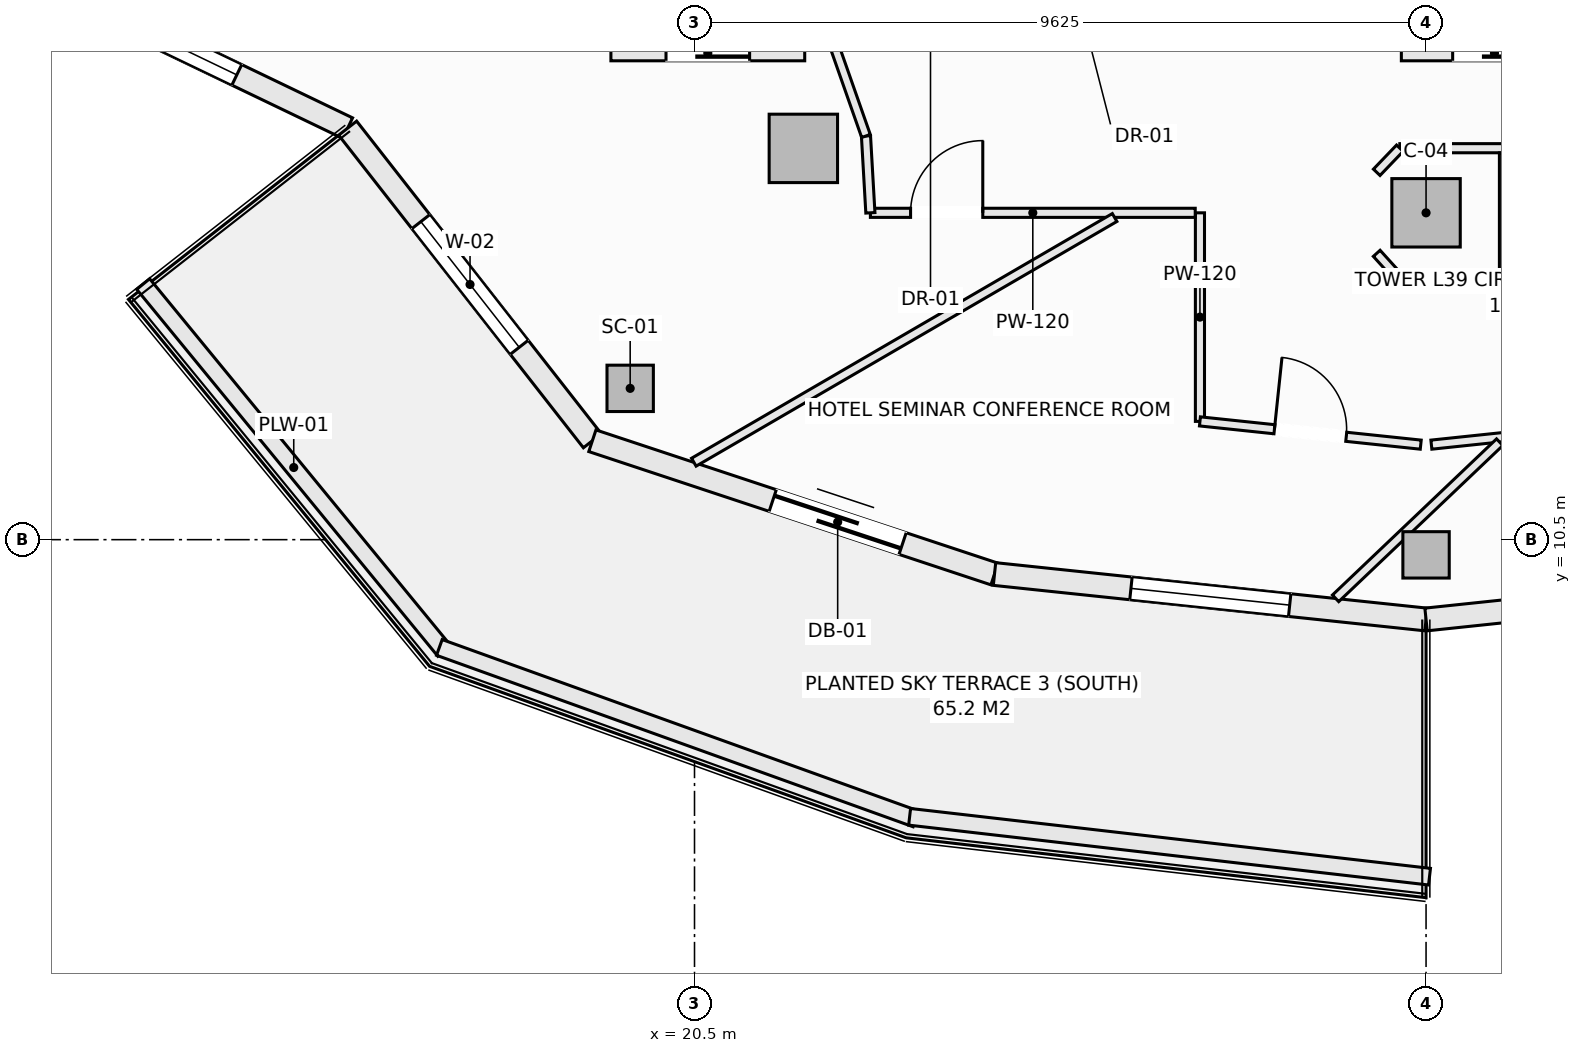
"""IFC4 building model, lengths in metres.
Left out: names, types, materials, properties, quantities, classifications, styles, units other than length and angle.
Written with IfcOpenShell. Run it as: python <this file> out.ifc"""

import sys

from ifc_helpers import new_model, si_unit, direction, frame, frame_2d, origin, origin_2d, place, context, subcontext, project, spatial, rectangle, hollow_rectangle, extrude, element, fill, save


model = new_model("IFC4")
c1 = context("Model", 3, precision=1e-05, world=origin(), true_north=direction((0.0, 1.0)))
c2 = subcontext(c1, "Body", "Model", "MODEL_VIEW")
j1 = project(units=[si_unit("LENGTHUNIT", "METRE"), si_unit("PLANEANGLEUNIT", "RADIAN")], contexts=[c1])
p1 = place(None, origin())
s1 = spatial("IfcSite", under=j1, at=p1, CompositionType="ELEMENT")
p2 = place(p1, origin())
s2 = spatial("IfcBuilding", under=s1, at=p2, CompositionType="ELEMENT")
p3 = place(p2, frame((0.0, 0.0, 152.9)))
s3 = spatial("IfcBuildingStorey", under=s2, at=p3, CompositionType="ELEMENT", Elevation=152.9)
for number, where, z_axis, x_axis in (
    (1, (19.654, 12.49, -0.27), (0.0, 0.0, 1.0), (1.0, 0.0, 0.0)),
    (2, (30.125, 10.3, -0.27), (0.0, 0.0, 1.0), (1.0, 0.0, 0.0)),
):
    element("IfcColumn", number, at=place(p3, frame(where, z_axis=z_axis, x_axis=x_axis)), inside=s3, PredefinedType="COLUMN", context=c2, shape_type="SweptSolid", body=[
        extrude(hollow_rectangle(XDim=0.61, YDim=0.61, WallThickness=0.025, at=origin_2d()), origin(), (0.0, 0.0, 1.0), 3.4),
    ])
for number, where, z_axis, x_axis in (
    (3, (21.932, 15.648, -0.27), (0.0, 0.0, 1.0), (1.0, 0.0, 0.0)),
    (4, (30.125, 14.8, -0.27), (0.0, 0.0, 1.0), (1.0, 0.0, 0.0)),
):
    element("IfcColumn", number, at=place(p3, frame(where, z_axis=z_axis, x_axis=x_axis)), inside=s3, PredefinedType="COLUMN", context=c2, shape_type="SweptSolid", body=[
        extrude(rectangle(XDim=0.9, YDim=0.9, at=origin_2d()), origin(), (0.0, 0.0, 1.0), 3.4),
    ])
p4 = place(p3, frame((11.127, 18.225, 0.0), z_axis=(0.0, 0.0, 1.0), x_axis=(0.901353070301, -0.433085029363, 0.0)))
e5 = element("IfcWall", 5, at=p4, inside=s3, PredefinedType="SOLIDWALL", context=c2, shape_type="SweptSolid", body=[
    extrude(rectangle(XDim=5.336, YDim=0.3, at=frame_2d((2.668, 0.0))), origin(), (0.0, 0.0, 1.0), 2.653),
])
p5 = place(p4, frame((1.618, 0.0, 0.74)))
e6 = element("IfcOpeningElement", 6, at=p5, cuts=e5, PredefinedType="OPENING", context=c2, shape_type="SweptSolid", body=[
    extrude(rectangle(XDim=2.1, YDim=1.7, at=frame_2d((1.05, 0.85))), frame((0.0, 0.16, 0.0), z_axis=(0.0, -1.0, 0.0), x_axis=(1.0, 0.0, 0.0)), (0.0, 0.0, 1.0), 0.32),
])
p6 = place(p3, frame((15.937, 15.914, 0.0), z_axis=(0.0, 0.0, 1.0), x_axis=(0.616429245738, -0.787410302828, 0.0)))
e7 = element("IfcWall", 7, at=p6, inside=s3, PredefinedType="SOLIDWALL", context=c2, shape_type="SweptSolid", body=[
    extrude(rectangle(XDim=5.223, YDim=0.3, at=frame_2d((2.612, 0.0))), origin(), (0.0, 0.0, 1.0), 2.653),
])
p7 = place(p6, frame((1.562, 0.0, 0.74)))
e8 = element("IfcOpeningElement", 8, at=p7, cuts=e7, PredefinedType="OPENING", context=c2, shape_type="SweptSolid", body=[
    extrude(rectangle(XDim=2.1, YDim=1.7, at=frame_2d((1.05, 0.85))), frame((0.0, 0.16, 0.0), z_axis=(0.0, -1.0, 0.0), x_axis=(1.0, 0.0, 0.0)), (0.0, 0.0, 1.0), 0.32),
])
p8 = place(p3, frame((19.156, 11.801, 0.0), z_axis=(0.0, 0.0, 1.0), x_axis=(0.949246811547, -0.314532177636, 0.0)))
e9 = element("IfcWall", 9, at=p8, inside=s3, PredefinedType="SOLIDWALL", context=c2, shape_type="SweptSolid", body=[
    extrude(rectangle(XDim=5.574, YDim=0.3, at=frame_2d((2.787, 0.0))), origin(), (0.0, 0.0, 1.0), 2.653),
])
p9 = place(p8, frame((2.5, 0.0, 0.0)))
e10 = element("IfcOpeningElement", 10, at=p9, cuts=e9, PredefinedType="OPENING", context=c2, shape_type="SweptSolid", body=[
    extrude(rectangle(XDim=1.8, YDim=2.25, at=frame_2d((0.9, 1.125))), frame((0.0, 0.16, 0.0), z_axis=(0.0, -1.0, 0.0), x_axis=(1.0, 0.0, 0.0)), (0.0, 0.0, 1.0), 0.32),
])
p10 = place(p3, frame((24.447, 10.048, 0.0), z_axis=(0.0, 0.0, 1.0), x_axis=(0.994496545245, -0.104769372887, 0.0)))
e11 = element("IfcWall", 11, at=p10, inside=s3, PredefinedType="SOLIDWALL", context=c2, shape_type="SweptSolid", body=[
    extrude(rectangle(XDim=5.709, YDim=0.3, at=frame_2d((2.854, 0.0))), origin(), (0.0, 0.0, 1.0), 2.653),
])
p11 = place(p10, frame((1.805, 0.0, 0.74)))
e12 = element("IfcOpeningElement", 12, at=p11, cuts=e11, PredefinedType="OPENING", context=c2, shape_type="SweptSolid", body=[
    extrude(rectangle(XDim=2.1, YDim=1.7, at=frame_2d((1.05, 0.85))), frame((0.0, 0.16, 0.0), z_axis=(0.0, -1.0, 0.0), x_axis=(1.0, 0.0, 0.0)), (0.0, 0.0, 1.0), 0.32),
])
p12 = place(p3, frame((30.125, 9.45, 0.0), z_axis=(0.0, 0.0, 1.0), x_axis=(0.994496545245, 0.104769372887, 0.0)))
e13 = element("IfcWall", 13, at=p12, inside=s3, PredefinedType="SOLIDWALL", context=c2, shape_type="SweptSolid", body=[
    extrude(rectangle(XDim=5.709, YDim=0.3, at=frame_2d((2.854, 0.0))), origin(), (0.0, 0.0, 1.0), 2.653),
])
p13 = place(p12, frame((1.805, 0.0, 0.74)))
e14 = element("IfcOpeningElement", 14, at=p13, cuts=e13, PredefinedType="OPENING", context=c2, shape_type="SweptSolid", body=[
    extrude(rectangle(XDim=2.1, YDim=1.7, at=frame_2d((1.05, 0.85))), frame((0.0, 0.16, 0.0), z_axis=(0.0, -1.0, 0.0), x_axis=(1.0, 0.0, 0.0)), (0.0, 0.0, 1.0), 0.32),
])
p14 = place(p3, frame((13.246, 13.863, 0.0), z_axis=(0.0, 0.0, 1.0), x_axis=(0.634429234628, -0.77298094818, 0.0)))
e15 = element("IfcWall", 15, at=p14, inside=s3, PredefinedType="PARAPET", context=c2, shape_type="SweptSolid", body=[
    extrude(rectangle(XDim=6.245, YDim=0.22, at=frame_2d((3.123, 0.0))), origin(), (0.0, 0.0, 1.0), 0.52),
])
p15 = place(p3, frame((17.143, 9.082, 0.0), z_axis=(0.0, 0.0, 1.0), x_axis=(0.940948576924, -0.338549517184, 0.0)))
e16 = element("IfcWall", 16, at=p15, inside=s3, PredefinedType="PARAPET", context=c2, shape_type="SweptSolid", body=[
    extrude(rectangle(XDim=6.664, YDim=0.22, at=frame_2d((3.332, 0.0))), origin(), (0.0, 0.0, 1.0), 0.52),
])
p16 = place(p3, frame((23.33, 6.854, 0.0), z_axis=(0.0, 0.0, 1.0), x_axis=(0.993440576506, -0.114349555972, 0.0)))
e17 = element("IfcWall", 17, at=p16, inside=s3, PredefinedType="PARAPET", context=c2, shape_type="SweptSolid", body=[
    extrude(rectangle(XDim=6.885, YDim=0.22, at=frame_2d((3.443, 0.0))), origin(), (0.0, 0.0, 1.0), 0.52),
])
p17 = place(p3, frame((19.4, 16.9, 0.0), z_axis=(0.0, 0.0, 1.0), x_axis=(1.0, 0.0, 0.0)))
e18 = element("IfcWall", 18, at=p17, inside=s3, PredefinedType="SOLIDWALL", context=c2, shape_type="SweptSolid", body=[
    extrude(rectangle(XDim=2.55, YDim=0.2, at=frame_2d((1.275, 0.0))), origin(), (0.0, 0.0, 1.0), 3.13),
])
p18 = place(p17, frame((0.725, 0.0, 0.0)))
e19 = element("IfcOpeningElement", 19, at=p18, cuts=e18, PredefinedType="OPENING", context=c2, shape_type="SweptSolid", body=[
    extrude(rectangle(XDim=1.1, YDim=2.2, at=frame_2d((0.55, 1.1))), frame((0.0, 0.11, 0.0), z_axis=(0.0, -1.0, 0.0), x_axis=(1.0, 0.0, 0.0)), (0.0, 0.0, 1.0), 0.22),
])
p19 = place(p3, frame((29.8, 16.9, 0.0), z_axis=(0.0, 0.0, 1.0), x_axis=(1.0, 0.0, 0.0)))
e20 = element("IfcWall", 20, at=p19, inside=s3, PredefinedType="SOLIDWALL", context=c2, shape_type="SweptSolid", body=[
    extrude(rectangle(XDim=2.45, YDim=0.2, at=frame_2d((1.225, 0.0))), origin(), (0.0, 0.0, 1.0), 3.13),
])
p20 = place(p19, frame((0.675, 0.0, 0.0)))
e21 = element("IfcOpeningElement", 21, at=p20, cuts=e20, PredefinedType="OPENING", context=c2, shape_type="SweptSolid", body=[
    extrude(rectangle(XDim=1.1, YDim=2.2, at=frame_2d((0.55, 1.1))), frame((0.0, 0.11, 0.0), z_axis=(0.0, -1.0, 0.0), x_axis=(1.0, 0.0, 0.0)), (0.0, 0.0, 1.0), 0.22),
])
p21 = place(p3, frame((27.15, 12.056, 0.0), z_axis=(0.0, 0.0, 1.0), x_axis=(0.0, 1.0, 0.0)))
e22 = element("IfcWall", 22, at=p21, inside=s3, PredefinedType="PARTITIONING", context=c2, shape_type="SweptSolid", body=[
    extrude(rectangle(XDim=2.744, YDim=0.12, at=frame_2d((1.372, 0.0))), origin(), (0.0, 0.0, 1.0), 3.13),
])
p22 = place(p3, frame((29.78, 15.65, 0.0), z_axis=(0.0, 0.0, 1.0), x_axis=(1.0, 0.0, 0.0)))
e23 = element("IfcWall", 23, at=p22, inside=s3, PredefinedType="PARTITIONING", context=c2, shape_type="SweptSolid", body=[
    extrude(rectangle(XDim=1.37, YDim=0.12, at=frame_2d((0.685, 0.0))), origin(), (0.0, 0.0, 1.0), 3.13),
])
p23 = place(p3, frame((30.195, 11.75, 0.0), z_axis=(0.0, 0.0, 1.0), x_axis=(0.994498907508, 0.104746947287, 0.0)))
e24 = element("IfcWall", 24, at=p23, inside=s3, PredefinedType="PARTITIONING", context=c2, shape_type="SweptSolid", body=[
    extrude(rectangle(XDim=5.724, YDim=0.12, at=frame_2d((2.862, 0.0))), origin(), (0.0, 0.0, 1.0), 3.13),
])
p24 = place(p23, frame((2.594, 0.0, 0.0)))
e25 = element("IfcOpeningElement", 25, at=p24, cuts=e24, PredefinedType="OPENING", context=c2, shape_type="SweptSolid", body=[
    extrude(rectangle(XDim=0.95, YDim=2.1, at=frame_2d((0.475, 1.05))), frame((0.0, 0.07, 0.0), z_axis=(0.0, -1.0, 0.0), x_axis=(1.0, 0.0, 0.0)), (0.0, 0.0, 1.0), 0.14),
])
p25 = place(p3, frame((27.15, 12.056, 0.0), z_axis=(0.0, 0.0, 1.0), x_axis=(0.994501330468, -0.104723940422, 0.0)))
e26 = element("IfcWall", 26, at=p25, inside=s3, PredefinedType="PARTITIONING", context=c2, shape_type="SweptSolid", body=[
    extrude(rectangle(XDim=2.921, YDim=0.12, at=frame_2d((1.46, 0.0))), origin(), (0.0, 0.0, 1.0), 3.13),
])
p26 = place(p25, frame((0.986, 0.0, 0.0)))
e27 = element("IfcOpeningElement", 27, at=p26, cuts=e26, PredefinedType="OPENING", context=c2, shape_type="SweptSolid", body=[
    extrude(rectangle(XDim=0.95, YDim=2.1, at=frame_2d((0.475, 1.05))), frame((0.0, 0.07, 0.0), z_axis=(0.0, -1.0, 0.0), x_axis=(1.0, 0.0, 0.0)), (0.0, 0.0, 1.0), 0.14),
])
p27 = place(p3, frame((22.814, 14.8, 0.0), z_axis=(0.0, 0.0, 1.0), x_axis=(1.0, 0.0, 0.0)))
e28 = element("IfcWall", 28, at=p27, inside=s3, PredefinedType="PARTITIONING", context=c2, shape_type="SweptSolid", body=[
    extrude(rectangle(XDim=4.274, YDim=0.12, at=frame_2d((2.137, 0.0))), origin(), (0.0, 0.0, 1.0), 3.13),
])
p28 = place(p27, frame((0.529, 0.0, 0.0)))
e29 = element("IfcOpeningElement", 29, at=p28, cuts=e28, PredefinedType="OPENING", context=c2, shape_type="SweptSolid", body=[
    extrude(rectangle(XDim=0.95, YDim=2.1, at=frame_2d((0.475, 1.05))), frame((0.0, 0.07, 0.0), z_axis=(0.0, -1.0, 0.0), x_axis=(1.0, 0.0, 0.0)), (0.0, 0.0, 1.0), 0.14),
])
p29 = place(p3, frame((22.756, 15.811, 0.0), z_axis=(0.0, 0.0, 1.0), x_axis=(0.057139047697, -0.998366230012, 0.0)))
e30 = element("IfcWall", 30, at=p29, inside=s3, PredefinedType="PARTITIONING", context=c2, shape_type="SweptSolid", body=[
    extrude(rectangle(XDim=1.013, YDim=0.12, at=frame_2d((0.506, 0.0))), origin(), (0.0, 0.0, 1.0), 3.13),
])
p30 = place(p3, frame((22.353, 16.958, 0.0), z_axis=(0.0, 0.0, 1.0), x_axis=(0.331370038458, -0.943500873138, 0.0)))
e31 = element("IfcWall", 31, at=p30, inside=s3, PredefinedType="PARTITIONING", context=c2, shape_type="SweptSolid", body=[
    extrude(rectangle(XDim=1.216, YDim=0.12, at=frame_2d((0.608, 0.0))), origin(), (0.0, 0.0, 1.0), 3.13),
])
p31 = place(p3, frame((29.476, 15.333, 0.0), z_axis=(0.0, 0.0, 1.0), x_axis=(0.692219273951, 0.721687243043, 0.0)))
e32 = element("IfcWall", 32, at=p31, inside=s3, PredefinedType="PARTITIONING", context=c2, shape_type="SweptSolid", body=[
    extrude(rectangle(XDim=0.439, YDim=0.12, at=frame_2d((0.22, 0.0))), origin(), (0.0, 0.0, 1.0), 3.13),
])
p32 = place(p3, frame((29.476, 14.267, 0.0), z_axis=(0.0, 0.0, 1.0), x_axis=(0.670659392016, -0.741765448037, 0.0)))
e33 = element("IfcWall", 33, at=p32, inside=s3, PredefinedType="PARTITIONING", context=c2, shape_type="SweptSolid", body=[
    extrude(rectangle(XDim=0.453, YDim=0.12, at=frame_2d((0.227, 0.0))), origin(), (0.0, 0.0, 1.0), 3.13),
])
p33 = place(p3, frame((29.78, 13.85, 0.0), z_axis=(0.0, 0.0, 1.0), x_axis=(1.0, 0.0, 0.0)))
e34 = element("IfcWall", 34, at=p33, inside=s3, PredefinedType="PARTITIONING", context=c2, shape_type="SweptSolid", body=[
    extrude(rectangle(XDim=1.37, YDim=0.12, at=frame_2d((0.685, 0.0))), origin(), (0.0, 0.0, 1.0), 3.13),
])
p34 = place(p3, frame((31.15, 13.912, 0.0), z_axis=(0.0, 0.0, 1.0), x_axis=(0.0, 1.0, 0.0)))
e35 = element("IfcWall", 35, at=p34, inside=s3, PredefinedType="PARTITIONING", context=c2, shape_type="SweptSolid", body=[
    extrude(rectangle(XDim=1.676, YDim=0.12, at=frame_2d((0.838, 0.0))), origin(), (0.0, 0.0, 1.0), 3.13),
])
p35 = place(p3, frame((20.491, 11.519, 0.0), z_axis=(0.0, 0.0, 1.0), x_axis=(0.864495629624, 0.502640334991, 0.0)))
e36 = element("IfcWall", 36, at=p35, inside=s3, PredefinedType="PARTITIONING", context=c2, shape_type="SweptSolid", body=[
    extrude(rectangle(XDim=6.404, YDim=0.12, at=frame_2d((3.202, 0.0))), origin(), (0.0, 0.0, 1.0), 3.13),
])
p36 = place(p3, frame((28.935, 9.728, 0.0), z_axis=(0.0, 0.0, 1.0), x_axis=(0.724541098321, 0.689231598843, 0.0)))
e37 = element("IfcWall", 37, at=p36, inside=s3, PredefinedType="PARTITIONING", context=c2, shape_type="SweptSolid", body=[
    extrude(rectangle(XDim=2.98, YDim=0.12, at=frame_2d((1.49, 0.0))), origin(), (0.0, 0.0, 1.0), 2.703),
])
p37 = place(p5, origin())
e38 = element("IfcWindow", 38, at=p37, inside=s3, PartitioningType="SINGLE_PANEL", PredefinedType="WINDOW", context=c2, shape_type="SweptSolid", body=[
    extrude(rectangle(XDim=2.1, YDim=1.7, at=frame_2d((1.05, 0.85))), frame((0.0, 0.03, 0.0), z_axis=(0.0, -1.0, 0.0), x_axis=(1.0, 0.0, 0.0)), (0.0, 0.0, 1.0), 0.06),
])
fill(e6, e38)
p38 = place(p7, origin())
e39 = element("IfcWindow", 39, at=p38, inside=s3, PartitioningType="SINGLE_PANEL", PredefinedType="WINDOW", context=c2, shape_type="SweptSolid", body=[
    extrude(rectangle(XDim=2.1, YDim=1.7, at=frame_2d((1.05, 0.85))), frame((0.0, 0.03, 0.0), z_axis=(0.0, -1.0, 0.0), x_axis=(1.0, 0.0, 0.0)), (0.0, 0.0, 1.0), 0.06),
])
fill(e8, e39)
p39 = place(p9, frame((1.8, 0.0, 0.0), z_axis=(0.0, 0.0, 1.0), x_axis=(-1.0, 0.0, 0.0)))
e40 = element("IfcDoor", 40, at=p39, inside=s3, OperationType="SLIDING_TO_LEFT", PredefinedType="DOOR", context=c2, shape_type="SweptSolid", body=[
    extrude(rectangle(XDim=1.8, YDim=2.25, at=frame_2d((0.9, 1.125))), frame((0.0, 0.025, 0.0), z_axis=(0.0, -1.0, 0.0), x_axis=(1.0, 0.0, 0.0)), (0.0, 0.0, 1.0), 0.05),
])
fill(e10, e40)
p40 = place(p11, origin())
e41 = element("IfcWindow", 41, at=p40, inside=s3, PartitioningType="SINGLE_PANEL", PredefinedType="WINDOW", context=c2, shape_type="SweptSolid", body=[
    extrude(rectangle(XDim=2.1, YDim=1.7, at=frame_2d((1.05, 0.85))), frame((0.0, 0.03, 0.0), z_axis=(0.0, -1.0, 0.0), x_axis=(1.0, 0.0, 0.0)), (0.0, 0.0, 1.0), 0.06),
])
fill(e12, e41)
p41 = place(p18, origin())
e42 = element("IfcDoor", 42, at=p41, inside=s3, OperationType="SLIDING_TO_LEFT", PredefinedType="DOOR", context=c2, shape_type="SweptSolid", body=[
    extrude(rectangle(XDim=1.1, YDim=2.2, at=frame_2d((0.55, 1.1))), frame((0.0, 0.025, 0.0), z_axis=(0.0, -1.0, 0.0), x_axis=(1.0, 0.0, 0.0)), (0.0, 0.0, 1.0), 0.05),
])
fill(e19, e42)
p42 = place(p20, origin())
e43 = element("IfcDoor", 43, at=p42, inside=s3, OperationType="SLIDING_TO_LEFT", PredefinedType="DOOR", context=c2, shape_type="SweptSolid", body=[
    extrude(rectangle(XDim=1.1, YDim=2.2, at=frame_2d((0.55, 1.1))), frame((0.0, 0.025, 0.0), z_axis=(0.0, -1.0, 0.0), x_axis=(1.0, 0.0, 0.0)), (0.0, 0.0, 1.0), 0.05),
])
fill(e21, e43)
p43 = place(p28, origin())
e44 = element("IfcDoor", 44, at=p43, inside=s3, OperationType="SINGLE_SWING_RIGHT", PredefinedType="DOOR", context=c2, shape_type="SweptSolid", body=[
    extrude(rectangle(XDim=0.95, YDim=2.1, at=frame_2d((0.475, 1.05))), frame((0.0, 0.025, 0.0), z_axis=(0.0, -1.0, 0.0), x_axis=(1.0, 0.0, 0.0)), (0.0, 0.0, 1.0), 0.05),
])
fill(e29, e44)
p44 = place(p26, origin())
e45 = element("IfcDoor", 45, at=p44, inside=s3, OperationType="SINGLE_SWING_LEFT", PredefinedType="DOOR", context=c2, shape_type="SweptSolid", body=[
    extrude(rectangle(XDim=0.95, YDim=2.1, at=frame_2d((0.475, 1.05))), frame((0.0, 0.025, 0.0), z_axis=(0.0, -1.0, 0.0), x_axis=(1.0, 0.0, 0.0)), (0.0, 0.0, 1.0), 0.05),
])
fill(e27, e45)
save(model, sys.argv[1])
